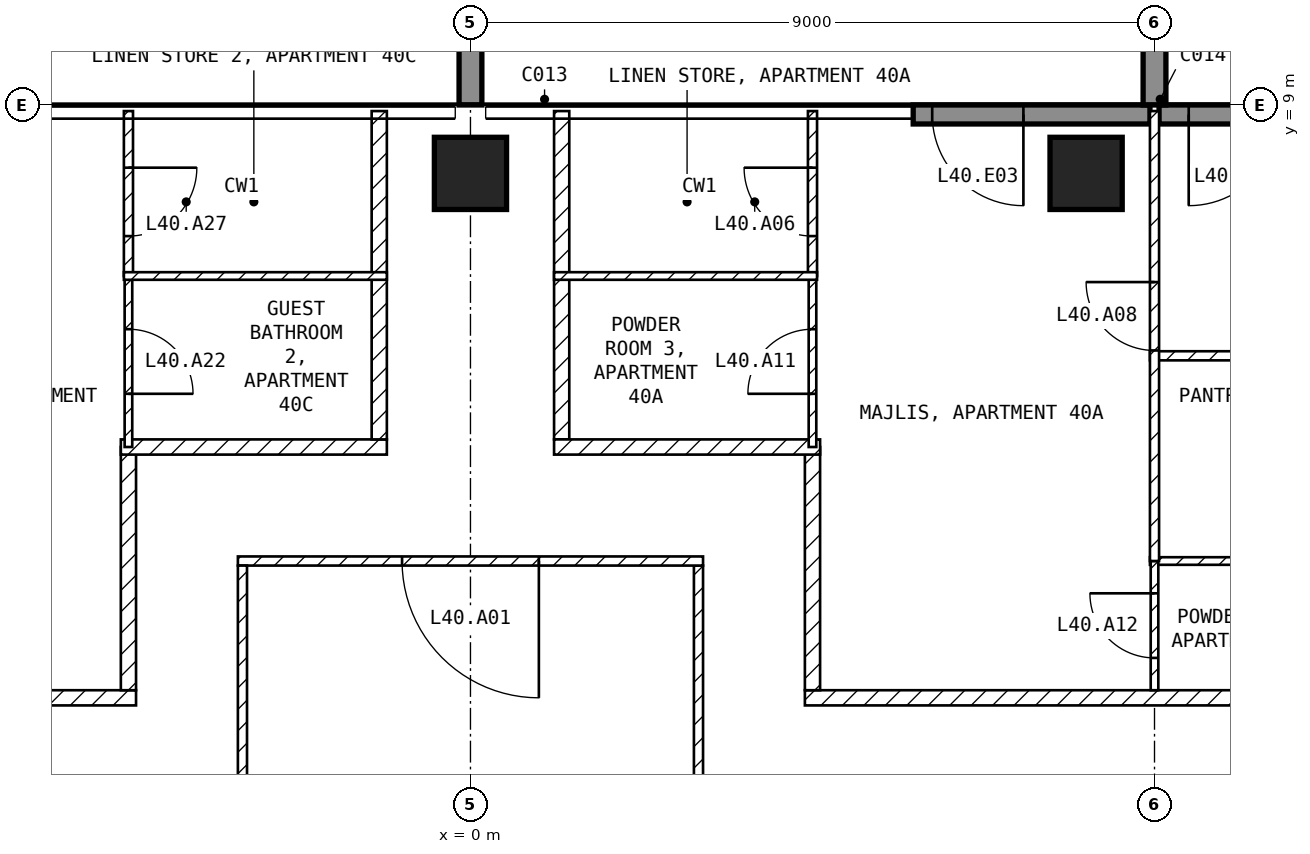
"""IFC4 building model, lengths in metres.
Left out: names, types, materials, properties, quantities, classifications, styles, units other than length and angle.
Written with IfcOpenShell. Run it as: python <this file> out.ifc"""

import sys

from ifc_helpers import new_model, si_unit, direction, frame, frame_2d, origin, origin_2d, place, context, subcontext, project, spatial, rectangle, extrude, element, fill, save


model = new_model("IFC4")
c1 = context("Model", 3, precision=1e-05, world=origin(), true_north=direction((0.0, 1.0)))
c2 = subcontext(c1, "Body", "Model", "MODEL_VIEW")
j1 = project(units=[si_unit("LENGTHUNIT", "METRE"), si_unit("PLANEANGLEUNIT", "RADIAN")], contexts=[c1])
p1 = place(None, origin())
s1 = spatial("IfcSite", under=j1, at=p1, CompositionType="ELEMENT")
p2 = place(p1, origin())
s2 = spatial("IfcBuilding", under=s1, at=p2, CompositionType="ELEMENT")
p3 = place(p2, frame((0.0, 0.0, 166.6)))
s3 = spatial("IfcBuildingStorey", under=s2, at=p3, CompositionType="ELEMENT", Elevation=166.6)
for number, where, z_axis, x_axis in (
    (1, (0.0, 8.1, -0.25), (0.0, 0.0, 1.0), (1.0, 0.0, 0.0)),
    (2, (8.1, 8.1, -0.25), (0.0, 0.0, 1.0), (1.0, 0.0, 0.0)),
):
    element("IfcColumn", number, at=place(p3, frame(where, z_axis=z_axis, x_axis=x_axis)), inside=s3, PredefinedType="COLUMN", context=c2, shape_type="SweptSolid", body=[
        extrude(rectangle(XDim=0.95, YDim=0.95, at=origin_2d()), origin(), (0.0, 0.0, 1.0), 3.5),
    ])
p4 = place(p3, frame((10.9, 8.875, 0.0), z_axis=(0.0, 0.0, 1.0), x_axis=(-1.0, 0.0, 0.0)))
e3 = element("IfcWall", 3, at=p4, inside=s3, PredefinedType="SOLIDWALL", context=c2, shape_type="SweptSolid", body=[
    extrude(rectangle(XDim=1.84, YDim=0.25, at=frame_2d((0.92, 0.0))), origin(), (0.0, 0.0, 1.0), 3.25),
])
p5 = place(p4, frame((0.25, 0.0, 0.0)))
e4 = element("IfcOpeningElement", 4, at=p5, cuts=e3, PredefinedType="OPENING", context=c2, shape_type="SweptSolid", body=[
    extrude(rectangle(XDim=1.2, YDim=2.4, at=frame_2d((0.6, 1.2))), frame((0.0, 0.135, 0.0), z_axis=(0.0, -1.0, 0.0), x_axis=(1.0, 0.0, 0.0)), (0.0, 0.0, 1.0), 0.27),
])
p6 = place(p3, frame((8.94, 8.875, 0.0), z_axis=(0.0, 0.0, 1.0), x_axis=(-1.0, 0.0, 0.0)))
e5 = element("IfcWall", 5, at=p6, inside=s3, PredefinedType="SOLIDWALL", context=c2, shape_type="SweptSolid", body=[
    extrude(rectangle(XDim=3.115, YDim=0.25, at=frame_2d((1.558, 0.0))), origin(), (0.0, 0.0, 1.0), 3.25),
])
p7 = place(p6, frame((1.665, 0.0, 0.0)))
e6 = element("IfcOpeningElement", 6, at=p7, cuts=e5, PredefinedType="OPENING", context=c2, shape_type="SweptSolid", body=[
    extrude(rectangle(XDim=1.2, YDim=2.4, at=frame_2d((0.6, 1.2))), frame((0.0, 0.135, 0.0), z_axis=(0.0, -1.0, 0.0), x_axis=(1.0, 0.0, 0.0)), (0.0, 0.0, 1.0), 0.27),
])
for number, where, z_axis, x_axis in (
    (7, (0.0, 9.0, 0.0), (0.0, 0.0, 1.0), (0.0, 1.0, 0.0)),
    (8, (9.0, 9.0, 0.0), (0.0, 0.0, 1.0), (0.0, 1.0, 0.0)),
):
    element("IfcWall", number, at=place(p3, frame(where, z_axis=z_axis, x_axis=x_axis)), inside=s3, PredefinedType="SOLIDWALL", context=c2, shape_type="SweptSolid", body=[
        extrude(rectangle(XDim=2.7, YDim=0.3, at=frame_2d((1.35, 0.0))), origin(), (0.0, 0.0, 1.0), 3.25),
    ])
p8 = place(p3, frame((3.0, -2.94, 0.0), z_axis=(0.0, 0.0, 1.0), x_axis=(0.0, 1.0, 0.0)))
e9 = element("IfcWall", 9, at=p8, inside=s3, PredefinedType="PARTITIONING", context=c2, shape_type="SweptSolid", body=[
    extrude(rectangle(XDim=5.88, YDim=0.12, at=frame_2d((2.94, 0.0))), origin(), (0.0, 0.0, 1.0), 3.25),
])
p9 = place(p3, frame((3.06, 3.0, 0.0), z_axis=(0.0, 0.0, 1.0), x_axis=(-1.0, 0.0, 0.0)))
e10 = element("IfcWall", 10, at=p9, inside=s3, PredefinedType="PARTITIONING", context=c2, shape_type="SweptSolid", body=[
    extrude(rectangle(XDim=6.12, YDim=0.12, at=frame_2d((3.06, 0.0))), origin(), (0.0, 0.0, 1.0), 3.25),
])
p10 = place(p9, frame((2.16, 0.0, 0.0)))
e11 = element("IfcOpeningElement", 11, at=p10, cuts=e10, PredefinedType="OPENING", context=c2, shape_type="SweptSolid", body=[
    extrude(rectangle(XDim=1.8, YDim=2.1, at=frame_2d((0.9, 1.05))), frame((0.0, 0.07, 0.0), z_axis=(0.0, -1.0, 0.0), x_axis=(1.0, 0.0, 0.0)), (0.0, 0.0, 1.0), 0.14),
])
p11 = place(p3, frame((-3.0, 2.94, 0.0), z_axis=(0.0, 0.0, 1.0), x_axis=(0.0, -1.0, 0.0)))
e12 = element("IfcWall", 12, at=p11, inside=s3, PredefinedType="PARTITIONING", context=c2, shape_type="SweptSolid", body=[
    extrude(rectangle(XDim=5.88, YDim=0.12, at=frame_2d((2.94, 0.0))), origin(), (0.0, 0.0, 1.0), 3.25),
])
p12 = place(p3, frame((4.4, 1.2, 0.0), z_axis=(0.0, 0.0, 1.0), x_axis=(1.0, 0.0, 0.0)))
e13 = element("IfcWall", 13, at=p12, inside=s3, PredefinedType="PARTITIONING", context=c2, shape_type="SweptSolid", body=[
    extrude(rectangle(XDim=17.2, YDim=0.2, at=frame_2d((8.6, 0.0))), origin(), (0.0, 0.0, 1.0), 3.25),
])
p13 = place(p12, frame((10.475, 0.0, 0.0)))
e14 = element("IfcOpeningElement", 14, at=p13, cuts=e13, PredefinedType="OPENING", context=c2, shape_type="SweptSolid", body=[
    extrude(rectangle(XDim=1.0, YDim=2.1, at=frame_2d((0.5, 1.05))), frame((0.0, 0.11, 0.0), z_axis=(0.0, -1.0, 0.0), x_axis=(1.0, 0.0, 0.0)), (0.0, 0.0, 1.0), 0.22),
])
p14 = place(p3, frame((4.5, 4.5, 0.0), z_axis=(0.0, 0.0, 1.0), x_axis=(0.0, -1.0, 0.0)))
e15 = element("IfcWall", 15, at=p14, inside=s3, PredefinedType="PARTITIONING", context=c2, shape_type="SweptSolid", body=[
    extrude(rectangle(XDim=3.2, YDim=0.2, at=frame_2d((1.6, 0.0))), origin(), (0.0, 0.0, 1.0), 3.25),
])
p15 = place(p3, frame((1.2, 8.92, 0.0), z_axis=(0.0, 0.0, 1.0), x_axis=(0.0, -1.0, 0.0)))
e16 = element("IfcWall", 16, at=p15, inside=s3, PredefinedType="PARTITIONING", context=c2, shape_type="SweptSolid", body=[
    extrude(rectangle(XDim=4.32, YDim=0.2, at=frame_2d((2.16, 0.0))), origin(), (0.0, 0.0, 1.0), 3.25),
])
p16 = place(p3, frame((1.1, 4.5, 0.0), z_axis=(0.0, 0.0, 1.0), x_axis=(1.0, 0.0, 0.0)))
e17 = element("IfcWall", 17, at=p16, inside=s3, PredefinedType="PARTITIONING", context=c2, shape_type="SweptSolid", body=[
    extrude(rectangle(XDim=3.5, YDim=0.2, at=frame_2d((1.75, 0.0))), origin(), (0.0, 0.0, 1.0), 3.25),
])
p17 = place(p3, frame((-21.6, 1.2, 0.0), z_axis=(0.0, 0.0, 1.0), x_axis=(1.0, 0.0, 0.0)))
e18 = element("IfcWall", 18, at=p17, inside=s3, PredefinedType="PARTITIONING", context=c2, shape_type="SweptSolid", body=[
    extrude(rectangle(XDim=17.2, YDim=0.2, at=frame_2d((8.6, 0.0))), origin(), (0.0, 0.0, 1.0), 3.25),
])
p18 = place(p17, frame((3.475, 0.0, 0.0)))
e19 = element("IfcOpeningElement", 19, at=p18, cuts=e18, PredefinedType="OPENING", context=c2, shape_type="SweptSolid", body=[
    extrude(rectangle(XDim=1.0, YDim=2.1, at=frame_2d((0.5, 1.05))), frame((0.0, 0.11, 0.0), z_axis=(0.0, -1.0, 0.0), x_axis=(1.0, 0.0, 0.0)), (0.0, 0.0, 1.0), 0.22),
])
p19 = place(p3, frame((-4.5, 1.3, 0.0), z_axis=(0.0, 0.0, 1.0), x_axis=(0.0, 1.0, 0.0)))
e20 = element("IfcWall", 20, at=p19, inside=s3, PredefinedType="PARTITIONING", context=c2, shape_type="SweptSolid", body=[
    extrude(rectangle(XDim=3.2, YDim=0.2, at=frame_2d((1.6, 0.0))), origin(), (0.0, 0.0, 1.0), 3.25),
])
p20 = place(p3, frame((-4.6, 4.5, 0.0), z_axis=(0.0, 0.0, 1.0), x_axis=(1.0, 0.0, 0.0)))
e21 = element("IfcWall", 21, at=p20, inside=s3, PredefinedType="PARTITIONING", context=c2, shape_type="SweptSolid", body=[
    extrude(rectangle(XDim=3.5, YDim=0.2, at=frame_2d((1.75, 0.0))), origin(), (0.0, 0.0, 1.0), 3.25),
])
p21 = place(p3, frame((-1.2, 4.6, 0.0), z_axis=(0.0, 0.0, 1.0), x_axis=(0.0, 1.0, 0.0)))
e22 = element("IfcWall", 22, at=p21, inside=s3, PredefinedType="PARTITIONING", context=c2, shape_type="SweptSolid", body=[
    extrude(rectangle(XDim=4.32, YDim=0.2, at=frame_2d((2.16, 0.0))), origin(), (0.0, 0.0, 1.0), 3.25),
])
p22 = place(p3, frame((8.94, 3.0, 0.0), z_axis=(0.0, 0.0, 1.0), x_axis=(1.0, 0.0, 0.0)))
e23 = element("IfcWall", 23, at=p22, inside=s3, PredefinedType="PARTITIONING", context=c2, shape_type="SweptSolid", body=[
    extrude(rectangle(XDim=2.46, YDim=0.1, at=frame_2d((1.23, 0.0))), origin(), (0.0, 0.0, 1.0), 3.25),
])
p23 = place(p3, frame((9.0, 1.3, 0.0), z_axis=(0.0, 0.0, 1.0), x_axis=(0.0, 1.0, 0.0)))
e24 = element("IfcWall", 24, at=p23, inside=s3, PredefinedType="PARTITIONING", context=c2, shape_type="SweptSolid", body=[
    extrude(rectangle(XDim=1.7, YDim=0.1, at=frame_2d((0.85, 0.0))), origin(), (0.0, 0.0, 1.0), 3.25),
])
p24 = place(p23, frame((0.425, 0.0, 0.0)))
e25 = element("IfcOpeningElement", 25, at=p24, cuts=e24, PredefinedType="OPENING", context=c2, shape_type="SweptSolid", body=[
    extrude(rectangle(XDim=0.85, YDim=2.1, at=frame_2d((0.425, 1.05))), frame((0.0, 0.06, 0.0), z_axis=(0.0, -1.0, 0.0), x_axis=(1.0, 0.0, 0.0)), (0.0, 0.0, 1.0), 0.12),
])
p25 = place(p3, frame((12.36, 5.7, 0.0), z_axis=(0.0, 0.0, 1.0), x_axis=(-1.0, 0.0, 0.0)))
e26 = element("IfcWall", 26, at=p25, inside=s3, PredefinedType="PARTITIONING", context=c2, shape_type="SweptSolid", body=[
    extrude(rectangle(XDim=3.42, YDim=0.12, at=frame_2d((1.71, 0.0))), origin(), (0.0, 0.0, 1.0), 3.25),
])
p26 = place(p3, frame((9.0, 3.0, 0.0), z_axis=(0.0, 0.0, 1.0), x_axis=(0.0, 1.0, 0.0)))
e27 = element("IfcWall", 27, at=p26, inside=s3, PredefinedType="PARTITIONING", context=c2, shape_type="SweptSolid", body=[
    extrude(rectangle(XDim=5.92, YDim=0.12, at=frame_2d((2.96, 0.0))), origin(), (0.0, 0.0, 1.0), 3.25),
])
p27 = place(p26, frame((2.77, 0.0, 0.0)))
e28 = element("IfcOpeningElement", 28, at=p27, cuts=e27, PredefinedType="OPENING", context=c2, shape_type="SweptSolid", body=[
    extrude(rectangle(XDim=0.9, YDim=2.1, at=frame_2d((0.45, 1.05))), frame((0.0, 0.07, 0.0), z_axis=(0.0, -1.0, 0.0), x_axis=(1.0, 0.0, 0.0)), (0.0, 0.0, 1.0), 0.14),
])
p28 = place(p3, frame((4.5, 4.5, 0.0), z_axis=(0.0, 0.0, 1.0), x_axis=(0.0, 1.0, 0.0)))
e29 = element("IfcWall", 29, at=p28, inside=s3, PredefinedType="PARTITIONING", context=c2, shape_type="SweptSolid", body=[
    extrude(rectangle(XDim=2.25, YDim=0.1, at=frame_2d((1.125, 0.0))), origin(), (0.0, 0.0, 1.0), 3.25),
])
p29 = place(p28, frame((0.7, 0.0, 0.0)))
e30 = element("IfcOpeningElement", 30, at=p29, cuts=e29, PredefinedType="OPENING", context=c2, shape_type="SweptSolid", body=[
    extrude(rectangle(XDim=0.85, YDim=2.1, at=frame_2d((0.425, 1.05))), frame((0.0, 0.06, 0.0), z_axis=(0.0, -1.0, 0.0), x_axis=(1.0, 0.0, 0.0)), (0.0, 0.0, 1.0), 0.12),
])
p30 = place(p3, frame((4.5, 6.75, 0.0), z_axis=(0.0, 0.0, 1.0), x_axis=(0.0, 1.0, 0.0)))
e31 = element("IfcWall", 31, at=p30, inside=s3, PredefinedType="PARTITIONING", context=c2, shape_type="SweptSolid", body=[
    extrude(rectangle(XDim=2.17, YDim=0.12, at=frame_2d((1.085, 0.0))), origin(), (0.0, 0.0, 1.0), 3.25),
])
p31 = place(p30, frame((0.525, 0.0, 0.0)))
e32 = element("IfcOpeningElement", 32, at=p31, cuts=e31, PredefinedType="OPENING", context=c2, shape_type="SweptSolid", body=[
    extrude(rectangle(XDim=0.9, YDim=2.1, at=frame_2d((0.45, 1.05))), frame((0.0, 0.07, 0.0), z_axis=(0.0, -1.0, 0.0), x_axis=(1.0, 0.0, 0.0)), (0.0, 0.0, 1.0), 0.14),
])
p32 = place(p3, frame((1.1, 6.75, 0.0), z_axis=(0.0, 0.0, 1.0), x_axis=(1.0, 0.0, 0.0)))
e33 = element("IfcWall", 33, at=p32, inside=s3, PredefinedType="PARTITIONING", context=c2, shape_type="SweptSolid", body=[
    extrude(rectangle(XDim=3.46, YDim=0.1, at=frame_2d((1.73, 0.0))), origin(), (0.0, 0.0, 1.0), 3.25),
])
p33 = place(p3, frame((-4.5, 6.75, 0.0), z_axis=(0.0, 0.0, 1.0), x_axis=(0.0, -1.0, 0.0)))
e34 = element("IfcWall", 34, at=p33, inside=s3, PredefinedType="PARTITIONING", context=c2, shape_type="SweptSolid", body=[
    extrude(rectangle(XDim=2.25, YDim=0.1, at=frame_2d((1.125, 0.0))), origin(), (0.0, 0.0, 1.0), 3.25),
])
p34 = place(p33, frame((0.7, 0.0, 0.0)))
e35 = element("IfcOpeningElement", 35, at=p34, cuts=e34, PredefinedType="OPENING", context=c2, shape_type="SweptSolid", body=[
    extrude(rectangle(XDim=0.85, YDim=2.1, at=frame_2d((0.425, 1.05))), frame((0.0, 0.06, 0.0), z_axis=(0.0, -1.0, 0.0), x_axis=(1.0, 0.0, 0.0)), (0.0, 0.0, 1.0), 0.12),
])
p35 = place(p3, frame((-4.5, 8.92, 0.0), z_axis=(0.0, 0.0, 1.0), x_axis=(0.0, -1.0, 0.0)))
e36 = element("IfcWall", 36, at=p35, inside=s3, PredefinedType="PARTITIONING", context=c2, shape_type="SweptSolid", body=[
    extrude(rectangle(XDim=2.17, YDim=0.12, at=frame_2d((1.085, 0.0))), origin(), (0.0, 0.0, 1.0), 3.25),
])
p36 = place(p35, frame((0.745, 0.0, 0.0)))
e37 = element("IfcOpeningElement", 37, at=p36, cuts=e36, PredefinedType="OPENING", context=c2, shape_type="SweptSolid", body=[
    extrude(rectangle(XDim=0.9, YDim=2.1, at=frame_2d((0.45, 1.05))), frame((0.0, 0.07, 0.0), z_axis=(0.0, -1.0, 0.0), x_axis=(1.0, 0.0, 0.0)), (0.0, 0.0, 1.0), 0.14),
])
p37 = place(p3, frame((-4.56, 6.75, 0.0), z_axis=(0.0, 0.0, 1.0), x_axis=(1.0, 0.0, 0.0)))
e38 = element("IfcWall", 38, at=p37, inside=s3, PredefinedType="PARTITIONING", context=c2, shape_type="SweptSolid", body=[
    extrude(rectangle(XDim=3.46, YDim=0.1, at=frame_2d((1.73, 0.0))), origin(), (0.0, 0.0, 1.0), 3.25),
])
p38 = place(p5, origin())
e39 = element("IfcDoor", 39, at=p38, inside=s3, OperationType="SINGLE_SWING_RIGHT", PredefinedType="DOOR", context=c2, shape_type="SweptSolid", body=[
    extrude(rectangle(XDim=1.2, YDim=2.4, at=frame_2d((0.6, 1.2))), frame((0.0, 0.025, 0.0), z_axis=(0.0, -1.0, 0.0), x_axis=(1.0, 0.0, 0.0)), (0.0, 0.0, 1.0), 0.05),
])
fill(e4, e39)
p39 = place(p7, origin())
e40 = element("IfcDoor", 40, at=p39, inside=s3, OperationType="SINGLE_SWING_LEFT", PredefinedType="DOOR", context=c2, shape_type="SweptSolid", body=[
    extrude(rectangle(XDim=1.2, YDim=2.4, at=frame_2d((0.6, 1.2))), frame((0.0, 0.025, 0.0), z_axis=(0.0, -1.0, 0.0), x_axis=(1.0, 0.0, 0.0)), (0.0, 0.0, 1.0), 0.05),
])
fill(e6, e40)
p40 = place(p10, origin())
e41 = element("IfcDoor", 41, at=p40, inside=s3, OperationType="SINGLE_SWING_LEFT", PredefinedType="DOOR", context=c2, shape_type="SweptSolid", body=[
    extrude(rectangle(XDim=1.8, YDim=2.1, at=frame_2d((0.9, 1.05))), frame((0.0, 0.025, 0.0), z_axis=(0.0, -1.0, 0.0), x_axis=(1.0, 0.0, 0.0)), (0.0, 0.0, 1.0), 0.05),
])
fill(e11, e41)
p41 = place(p31, origin())
e42 = element("IfcDoor", 42, at=p41, inside=s3, OperationType="SINGLE_SWING_RIGHT", PredefinedType="DOOR", context=c2, shape_type="SweptSolid", body=[
    extrude(rectangle(XDim=0.9, YDim=2.1, at=frame_2d((0.45, 1.05))), frame((0.0, 0.025, 0.0), z_axis=(0.0, -1.0, 0.0), x_axis=(1.0, 0.0, 0.0)), (0.0, 0.0, 1.0), 0.05),
])
fill(e32, e42)
p42 = place(p27, origin())
e43 = element("IfcDoor", 43, at=p42, inside=s3, OperationType="SINGLE_SWING_RIGHT", PredefinedType="DOOR", context=c2, shape_type="SweptSolid", body=[
    extrude(rectangle(XDim=0.9, YDim=2.1, at=frame_2d((0.45, 1.05))), frame((0.0, 0.025, 0.0), z_axis=(0.0, -1.0, 0.0), x_axis=(1.0, 0.0, 0.0)), (0.0, 0.0, 1.0), 0.05),
])
fill(e28, e43)
p43 = place(p29, origin())
e44 = element("IfcDoor", 44, at=p43, inside=s3, OperationType="SINGLE_SWING_LEFT", PredefinedType="DOOR", context=c2, shape_type="SweptSolid", body=[
    extrude(rectangle(XDim=0.85, YDim=2.1, at=frame_2d((0.425, 1.05))), frame((0.0, 0.025, 0.0), z_axis=(0.0, -1.0, 0.0), x_axis=(1.0, 0.0, 0.0)), (0.0, 0.0, 1.0), 0.05),
])
fill(e30, e44)
p44 = place(p24, origin())
e45 = element("IfcDoor", 45, at=p44, inside=s3, OperationType="SINGLE_SWING_RIGHT", PredefinedType="DOOR", context=c2, shape_type="SweptSolid", body=[
    extrude(rectangle(XDim=0.85, YDim=2.1, at=frame_2d((0.425, 1.05))), frame((0.0, 0.025, 0.0), z_axis=(0.0, -1.0, 0.0), x_axis=(1.0, 0.0, 0.0)), (0.0, 0.0, 1.0), 0.05),
])
fill(e25, e45)
p45 = place(p34, origin())
e46 = element("IfcDoor", 46, at=p45, inside=s3, OperationType="SINGLE_SWING_RIGHT", PredefinedType="DOOR", context=c2, shape_type="SweptSolid", body=[
    extrude(rectangle(XDim=0.85, YDim=2.1, at=frame_2d((0.425, 1.05))), frame((0.0, 0.025, 0.0), z_axis=(0.0, -1.0, 0.0), x_axis=(1.0, 0.0, 0.0)), (0.0, 0.0, 1.0), 0.05),
])
fill(e35, e46)
p46 = place(p36, origin())
e47 = element("IfcDoor", 47, at=p46, inside=s3, OperationType="SINGLE_SWING_LEFT", PredefinedType="DOOR", context=c2, shape_type="SweptSolid", body=[
    extrude(rectangle(XDim=0.9, YDim=2.1, at=frame_2d((0.45, 1.05))), frame((0.0, 0.025, 0.0), z_axis=(0.0, -1.0, 0.0), x_axis=(1.0, 0.0, 0.0)), (0.0, 0.0, 1.0), 0.05),
])
fill(e37, e47)
save(model, sys.argv[1])
